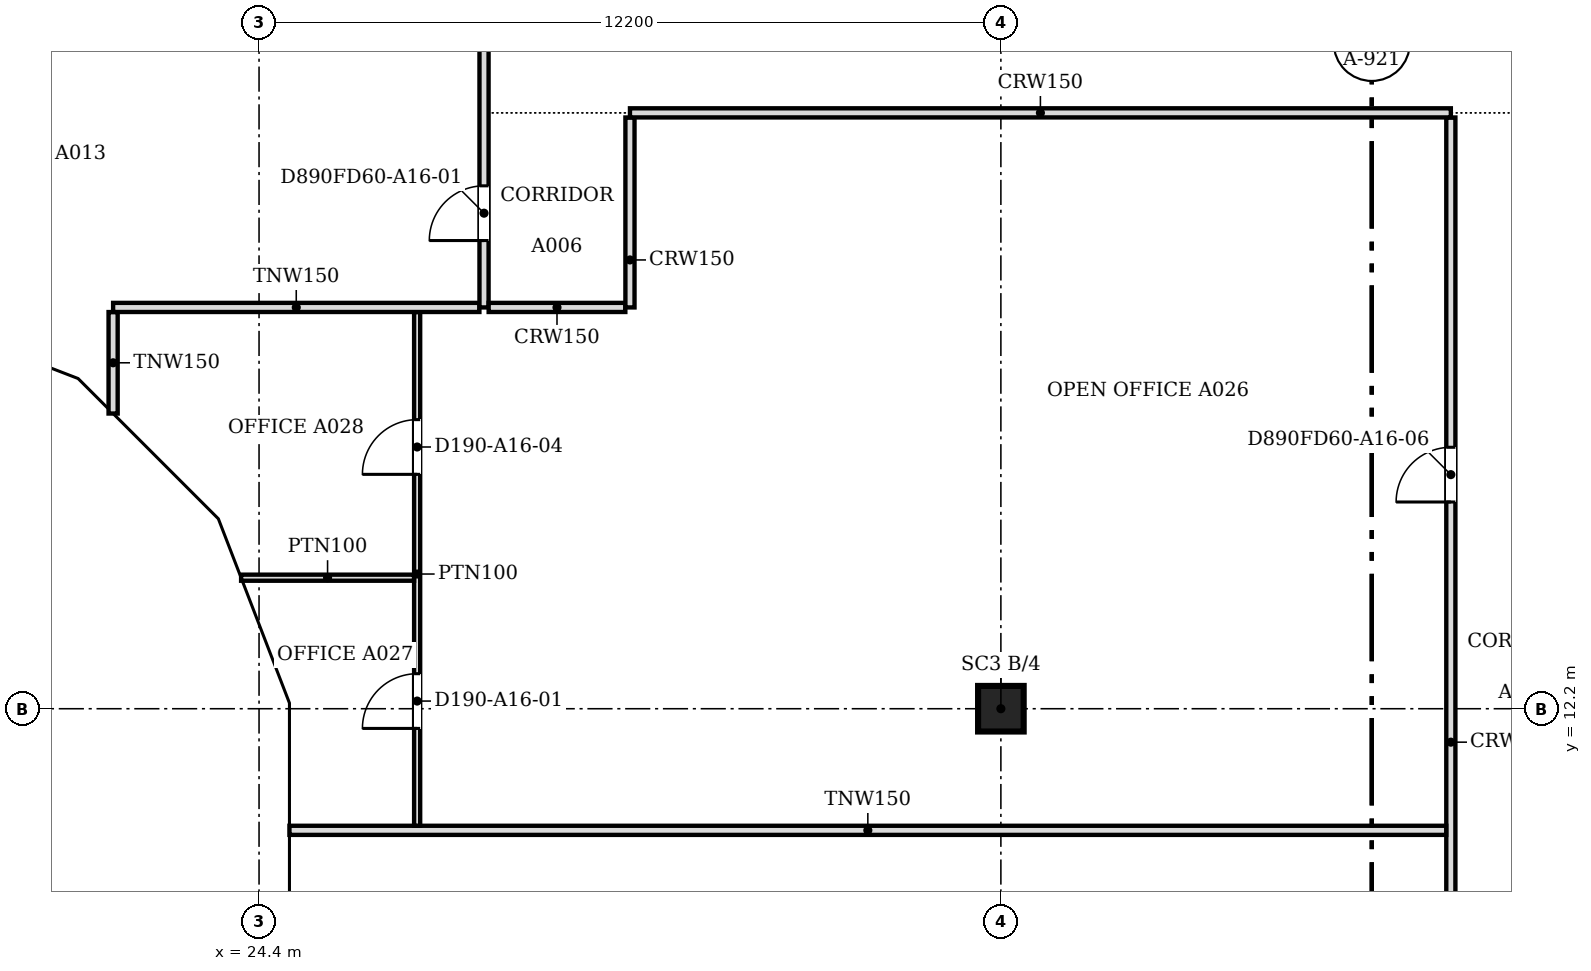
"""IFC4 building model, lengths in metres.
Left out: names, types, materials, properties, quantities, classifications, styles, units other than length and angle.
Written with IfcOpenShell. Run it as: python <this file> out.ifc"""

import sys

from ifc_helpers import new_model, si_unit, direction, frame, frame_2d, origin, origin_2d, place, context, subcontext, project, spatial, polyline, rectangle, outline, extrude, faceted_brep, source, transform, mapped, element, fill, save


model = new_model("IFC4")
c1 = context("Model", 3, precision=1e-05, world=origin(), true_north=direction((0.0, 1.0)))
c2 = subcontext(c1, "Body", "Model", "MODEL_VIEW")
j1 = project(units=[si_unit("LENGTHUNIT", "METRE"), si_unit("PLANEANGLEUNIT", "RADIAN")], contexts=[c1])
p1 = place(None, origin())
s1 = spatial("IfcSite", under=j1, at=p1, CompositionType="ELEMENT")
p2 = place(p1, origin())
s2 = spatial("IfcBuilding", under=s1, at=p2, CompositionType="ELEMENT")
p3 = place(p2, frame((0.0, 0.0, 178.2)))
s3 = spatial("IfcBuildingStorey", under=s2, at=p3, CompositionType="ELEMENT", Elevation=178.2)
p4 = place(p3, frame((36.6, 12.2, 0.0), z_axis=(0.0, 0.0, 1.0), x_axis=(1.0, 0.0, 0.0)))
e1 = element("IfcColumn", 1, at=p4, inside=s3, PredefinedType="COLUMN", context=c2, shape_type="SweptSolid", body=[
    extrude(rectangle(XDim=0.75, YDim=0.75, at=origin_2d()), origin(), (0.0, 0.0, 1.0), 3.6),
])
m1 = source(origin(), c2, "Body", "Brep", [
    faceted_brep([(0.093, -0.25, 0.056), (3.143, -0.25, 3.736), (3.143, -0.25, 3.864), (0.093, -0.25, 7.544), (0.0, 0.25, 7.543), (0.047, 0.25, 7.6), (3.196, 0.25, 3.8), (0.047, 0.25, 0.0), (0.0, 0.25, 0.057), (3.196, -0.0, 3.8), (0.047, 0.0, 0.0), (0.047, 0.0, 7.6)], [[[0, 1, 2, 3]], [[4, 5, 6, 7, 8]], [[7, 6, 9, 1, 0, 10]], [[6, 5, 11, 3, 2, 9]], [[5, 4, 11]], [[8, 7, 10]], [[8, 10, 0, 3, 11, 4]], [[1, 9, 2]]]),
])
p5 = place(p3, frame((18.303, 18.567, -3.8), z_axis=(0.0, 0.0, 1.0), x_axis=(0.932978940178, -0.359930961693, 0.0)))
e2 = element("IfcWall", 2, at=p5, inside=s3, PredefinedType="SOLIDWALL", context=c2, shape_type="MappedRepresentation", body=[
    mapped(m1, transform((0.0, 0.0, 0.0), scale=1.0)),
])
m2 = source(origin(), c2, "Body", "SweptSolid", [
    extrude(outline(polyline([(0.247, 0.633), (2.871, 3.8), (0.247, 6.967), (0.247, 0.633)])), frame((0.0, 0.26, 0.0), z_axis=(0.0, -1.0, 0.0), x_axis=(1.0, 0.0, 0.0)), (0.0, 0.0, 1.0), 0.52),
])
p6 = place(p5, origin())
e3 = element("IfcOpeningElement", 3, at=p6, cuts=e2, PredefinedType="OPENING", context=c2, shape_type="MappedRepresentation", body=[
    mapped(m2, transform((0.0, 0.0, 0.0), scale=1.0)),
])
m3 = source(origin(), c2, "Body", "Brep", [
    faceted_brep([(3.103, -0.25, 7.536), (0.053, -0.25, 3.864), (0.053, -0.25, 3.736), (3.103, -0.25, 0.064), (0.0, 0.25, 3.8), (3.156, 0.25, 7.6), (3.209, 0.25, 7.536), (3.209, 0.25, 0.064), (3.156, 0.25, 0.0), (3.156, -0.0, 0.0), (3.156, -0.0, 7.6), (0.0, 0.0, 3.8)], [[[0, 1, 2, 3]], [[4, 5, 6, 7, 8]], [[8, 7, 9]], [[6, 5, 10]], [[5, 4, 11, 1, 0, 10]], [[4, 8, 9, 3, 2, 11]], [[11, 2, 1]], [[3, 9, 7, 6, 10, 0]]]),
])
p7 = place(p3, frame((21.285, 17.417, -3.8), z_axis=(0.0, 0.0, 1.0), x_axis=(0.707106781187, -0.707106781187, 0.0)))
e4 = element("IfcWall", 4, at=p7, inside=s3, PredefinedType="SOLIDWALL", context=c2, shape_type="MappedRepresentation", body=[
    mapped(m3, transform((0.0, 0.0, 0.0), scale=1.0)),
])
m4 = source(origin(), c2, "Body", "SweptSolid", [
    extrude(outline(polyline([(2.956, 6.968), (0.325, 3.8), (2.956, 0.632), (2.956, 6.968)])), frame((0.0, 0.26, 0.0), z_axis=(0.0, -1.0, 0.0), x_axis=(1.0, 0.0, 0.0)), (0.0, 0.0, 1.0), 0.52),
])
p8 = place(p7, origin())
e5 = element("IfcOpeningElement", 5, at=p8, cuts=e4, PredefinedType="OPENING", context=c2, shape_type="MappedRepresentation", body=[
    mapped(m4, transform((0.0, 0.0, 0.0), scale=1.0)),
])
m5 = source(origin(), c2, "Body", "Brep", [
    faceted_brep([(0.106, -0.25, 0.064), (3.156, -0.25, 3.744), (3.156, -0.25, 3.856), (0.106, -0.25, 7.536), (0.0, 0.25, 7.536), (0.053, 0.25, 7.6), (3.202, 0.25, 3.8), (0.053, 0.25, 0.0), (0.0, 0.25, 0.064), (3.202, -0.0, 3.8), (0.053, 0.0, 0.0), (0.053, 0.0, 7.6)], [[[0, 1, 2, 3]], [[4, 5, 6, 7, 8]], [[7, 6, 9, 1, 0, 10]], [[6, 5, 11, 3, 2, 9]], [[5, 4, 11]], [[8, 7, 10]], [[8, 10, 0, 3, 11, 4]], [[1, 9, 2]]]),
])
p9 = place(p3, frame((23.497, 15.234, -3.8), z_axis=(0.0, 0.0, 1.0), x_axis=(0.359913782069, -0.932985567668, 0.0)))
e6 = element("IfcWall", 6, at=p9, inside=s3, PredefinedType="SOLIDWALL", context=c2, shape_type="MappedRepresentation", body=[
    mapped(m5, transform((0.0, 0.0, 0.0), scale=1.0)),
])
m6 = source(origin(), c2, "Body", "SweptSolid", [
    extrude(outline(polyline([(0.253, 0.633), (2.878, 3.8), (0.253, 6.967), (0.253, 0.633)])), frame((0.0, 0.26, 0.0), z_axis=(0.0, -1.0, 0.0), x_axis=(1.0, 0.0, 0.0)), (0.0, 0.0, 1.0), 0.52),
])
p10 = place(p9, origin())
e7 = element("IfcOpeningElement", 7, at=p10, cuts=e6, PredefinedType="OPENING", context=c2, shape_type="MappedRepresentation", body=[
    mapped(m6, transform((0.0, 0.0, 0.0), scale=1.0)),
])
m7 = source(origin(), c2, "Body", "Brep", [
    faceted_brep([(3.096, -0.25, 0.0), (6.1, -0.25, 3.8), (3.096, -0.25, 7.6), (0.047, -0.25, 3.857), (0.047, -0.25, 3.743), (0.0, 0.25, 3.8), (3.096, 0.25, 7.6), (6.053, 0.25, 3.859), (6.053, 0.25, 3.741), (3.096, 0.25, 0.0), (6.1, -0.0, 3.8), (0.0, 0.0, 3.8)], [[[0, 1, 2, 3, 4]], [[5, 6, 7, 8, 9]], [[9, 8, 10, 1, 0]], [[7, 6, 2, 1, 10]], [[6, 5, 11, 3, 2]], [[5, 9, 0, 4, 11]], [[11, 4, 3]], [[10, 8, 7]]]),
])
p11 = place(p3, frame((24.65, 12.247, -3.8), z_axis=(0.0, 0.0, 1.0), x_axis=(0.0, -1.0, 0.0)))
e8 = element("IfcWall", 8, at=p11, inside=s3, PredefinedType="SOLIDWALL", context=c2, shape_type="MappedRepresentation", body=[
    mapped(m7, transform((0.0, 0.0, 0.0), scale=1.0)),
])
m8 = source(origin(), c2, "Body", "SweptSolid", [
    extrude(outline(polyline([(3.094, 0.399), (5.781, 3.8), (3.094, 7.201), (0.323, 3.8), (3.094, 0.399)])), frame((0.0, 0.26, 0.0), z_axis=(0.0, -1.0, 0.0), x_axis=(1.0, 0.0, 0.0)), (0.0, 0.0, 1.0), 0.52),
])
p12 = place(p11, origin())
e9 = element("IfcOpeningElement", 9, at=p12, cuts=e8, PredefinedType="OPENING", context=c2, shape_type="MappedRepresentation", body=[
    mapped(m8, transform((0.0, 0.0, 0.0), scale=1.0)),
])
p13 = place(p2, frame((0.0, 0.0, 182.0)))
s4 = spatial("IfcBuildingStorey", under=s2, at=p13, CompositionType="ELEMENT", Elevation=182.0)
m9 = source(origin(), c2, "Body", "Brep", [
    faceted_brep([(3.096, -0.25, 7.536), (0.047, -0.25, 3.856), (0.047, -0.25, 3.744), (3.096, -0.25, 0.064), (0.0, 0.25, 3.8), (3.149, 0.25, 7.6), (3.202, 0.25, 7.536), (3.202, 0.25, 0.064), (3.149, 0.25, 0.0), (3.149, -0.0, 0.0), (3.149, -0.0, 7.6), (0.0, 0.0, 3.8)], [[[0, 1, 2, 3]], [[4, 5, 6, 7, 8]], [[8, 7, 9]], [[6, 5, 10]], [[5, 4, 11, 1, 0, 10]], [[4, 8, 9, 3, 2, 11]], [[11, 2, 1]], [[3, 9, 7, 6, 10, 0]]]),
])
p14 = place(p13, frame((18.346, 18.55, -3.8), z_axis=(0.0, 0.0, 1.0), x_axis=(0.932985567668, -0.359913782069, 0.0)))
e10 = element("IfcWall", 10, at=p14, inside=s4, PredefinedType="SOLIDWALL", context=c2, shape_type="MappedRepresentation", body=[
    mapped(m9, transform((0.0, 0.0, 0.0), scale=1.0)),
])
m10 = source(origin(), c2, "Body", "SweptSolid", [
    extrude(outline(polyline([(2.949, 6.967), (0.325, 3.8), (2.949, 0.633), (2.949, 6.967)])), frame((0.0, 0.26, 0.0), z_axis=(0.0, -1.0, 0.0), x_axis=(1.0, 0.0, 0.0)), (0.0, 0.0, 1.0), 0.52),
])
p15 = place(p14, origin())
e11 = element("IfcOpeningElement", 11, at=p15, cuts=e10, PredefinedType="OPENING", context=c2, shape_type="MappedRepresentation", body=[
    mapped(m10, transform((0.0, 0.0, 0.0), scale=1.0)),
])
m11 = source(origin(), c2, "Body", "Brep", [
    faceted_brep([(0.106, -0.25, 0.064), (3.156, -0.25, 3.736), (3.156, -0.25, 3.864), (0.106, -0.25, 7.536), (0.0, 0.25, 7.536), (0.053, 0.25, 7.6), (3.209, 0.25, 3.8), (0.053, 0.25, 0.0), (0.0, 0.25, 0.064), (3.209, -0.0, 3.8), (0.053, 0.0, 0.0), (0.053, 0.0, 7.6)], [[[0, 1, 2, 3]], [[4, 5, 6, 7, 8]], [[7, 6, 9, 1, 0, 10]], [[6, 5, 11, 3, 2, 9]], [[5, 4, 11]], [[8, 7, 10]], [[8, 10, 0, 3, 11, 4]], [[1, 9, 2]]]),
])
p16 = place(p13, frame((21.248, 17.454, -3.8), z_axis=(0.0, 0.0, 1.0), x_axis=(0.707106781187, -0.707106781187, 0.0)))
e12 = element("IfcWall", 12, at=p16, inside=s4, PredefinedType="SOLIDWALL", context=c2, shape_type="MappedRepresentation", body=[
    mapped(m11, transform((0.0, 0.0, 0.0), scale=1.0)),
])
m12 = source(origin(), c2, "Body", "SweptSolid", [
    extrude(outline(polyline([(0.253, 0.632), (2.884, 3.8), (0.253, 6.968), (0.253, 0.632)])), frame((0.0, 0.26, 0.0), z_axis=(0.0, -1.0, 0.0), x_axis=(1.0, 0.0, 0.0)), (0.0, 0.0, 1.0), 0.52),
])
p17 = place(p16, origin())
e13 = element("IfcOpeningElement", 13, at=p17, cuts=e12, PredefinedType="OPENING", context=c2, shape_type="MappedRepresentation", body=[
    mapped(m12, transform((0.0, 0.0, 0.0), scale=1.0)),
])
m13 = source(origin(), c2, "Body", "Brep", [
    faceted_brep([(3.103, -0.25, 7.544), (0.053, -0.25, 3.864), (0.053, -0.25, 3.736), (3.103, -0.25, 0.056), (0.0, 0.25, 3.8), (3.149, 0.25, 7.6), (3.196, 0.25, 7.543), (3.196, 0.25, 0.057), (3.149, 0.25, 0.0), (3.149, -0.0, 0.0), (3.149, -0.0, 7.6), (0.0, 0.0, 3.8)], [[[0, 1, 2, 3]], [[4, 5, 6, 7, 8]], [[8, 7, 9]], [[6, 5, 10]], [[5, 4, 11, 1, 0, 10]], [[4, 8, 9, 3, 2, 11]], [[11, 2, 1]], [[3, 9, 7, 6, 10, 0]]]),
])
p18 = place(p13, frame((23.517, 15.185, -3.8), z_axis=(0.0, 0.0, 1.0), x_axis=(0.359864468756, -0.933004589553, 0.0)))
e14 = element("IfcWall", 14, at=p18, inside=s4, PredefinedType="SOLIDWALL", context=c2, shape_type="MappedRepresentation", body=[
    mapped(m13, transform((0.0, 0.0, 0.0), scale=1.0)),
])
p19 = place(p18, origin())
e15 = element("IfcOpeningElement", 15, at=p19, cuts=e14, PredefinedType="OPENING", context=c2, shape_type="MappedRepresentation", body=[
    mapped(m10, transform((0.0, 0.0, 0.0), scale=1.0)),
])
m14 = source(origin(), c2, "Body", "Brep", [
    faceted_brep([(0.093, -0.25, 0.057), (3.143, -0.25, 3.8), (0.093, -0.25, 7.543), (0.0, 0.25, 7.544), (0.047, 0.25, 7.6), (3.143, 0.25, 3.8), (0.047, 0.25, 0.0), (0.0, 0.25, 0.056), (0.047, 0.0, 0.0), (0.047, 0.0, 7.6)], [[[0, 1, 2]], [[3, 4, 5, 6, 7]], [[6, 5, 1, 0, 8]], [[5, 4, 9, 2, 1]], [[4, 3, 9]], [[7, 6, 8]], [[7, 8, 0, 2, 9, 3]]]),
])
p20 = place(p13, frame((24.65, 12.293, -3.8), z_axis=(0.0, 0.0, 1.0), x_axis=(0.0, -1.0, 0.0)))
e16 = element("IfcWall", 16, at=p20, inside=s4, PredefinedType="SOLIDWALL", context=c2, shape_type="MappedRepresentation", body=[
    mapped(m14, transform((0.0, 0.0, 0.0), scale=1.0)),
])
m15 = source(origin(), c2, "Body", "SweptSolid", [
    extrude(outline(polyline([(0.247, 0.641), (2.821, 3.8), (0.247, 6.959), (0.247, 0.641)])), frame((0.0, 0.26, 0.0), z_axis=(0.0, -1.0, 0.0), x_axis=(1.0, 0.0, 0.0)), (0.0, 0.0, 1.0), 0.52),
])
p21 = place(p20, origin())
e17 = element("IfcOpeningElement", 17, at=p21, cuts=e16, PredefinedType="OPENING", context=c2, shape_type="MappedRepresentation", body=[
    mapped(m15, transform((0.0, 0.0, 0.0), scale=1.0)),
])
p22 = place(p3, frame((44.0, 0.5, 0.0), z_axis=(0.0, 0.0, 1.0), x_axis=(0.0, 1.0, 0.0)))
e18 = element("IfcWall", 18, at=p22, inside=s3, PredefinedType="PARTITIONING", context=c2, shape_type="SweptSolid", body=[
    extrude(rectangle(XDim=21.424, YDim=0.15, at=frame_2d((10.712, 0.0))), origin(), (0.0, 0.0, 1.0), 3.067),
])
m16 = source(origin(), c2, "Body", "SweptSolid", [
    extrude(rectangle(XDim=1.0, YDim=2.1, at=frame_2d((0.5, 1.05))), frame((0.0, 0.085, 0.0), z_axis=(0.0, -1.0, 0.0), x_axis=(1.0, 0.0, 0.0)), (0.0, 0.0, 1.0), 0.17),
])
p23 = place(p22, frame((6.2, 0.0, 0.0)))
e19 = element("IfcOpeningElement", 19, at=p23, cuts=e18, PredefinedType="OPENING", context=c2, shape_type="MappedRepresentation", body=[
    mapped(m16, transform((0.0, 0.0, 0.0), scale=1.0)),
])
m17 = source(origin(), c2, "Body", "SweptSolid", [
    extrude(rectangle(XDim=0.9, YDim=2.1, at=frame_2d((0.45, 1.05))), frame((0.0, 0.085, 0.0), z_axis=(0.0, -1.0, 0.0), x_axis=(1.0, 0.0, 0.0)), (0.0, 0.0, 1.0), 0.17),
])
p24 = place(p22, frame((15.1, 0.0, 0.0)))
e20 = element("IfcOpeningElement", 20, at=p24, cuts=e18, PredefinedType="OPENING", context=c2, shape_type="MappedRepresentation", body=[
    mapped(m17, transform((0.0, 0.0, 0.0), scale=1.0)),
])
p25 = place(p3, frame((24.9, 10.2, 0.0), z_axis=(0.0, 0.0, 1.0), x_axis=(1.0, 0.0, 0.0)))
e21 = element("IfcWall", 21, at=p25, inside=s3, PredefinedType="PARTITIONING", context=c2, shape_type="SweptSolid", body=[
    extrude(rectangle(XDim=19.024, YDim=0.15, at=frame_2d((9.512, 0.0))), origin(), (0.0, 0.0, 1.0), 3.067),
])
p26 = place(p3, frame((27.0, 10.276, 0.0), z_axis=(0.0, 0.0, 1.0), x_axis=(0.0, 1.0, 0.0)))
e22 = element("IfcWall", 22, at=p26, inside=s3, PredefinedType="PARTITIONING", context=c2, shape_type="SweptSolid", body=[
    extrude(rectangle(XDim=8.448, YDim=0.1, at=frame_2d((4.224, 0.0))), origin(), (0.0, 0.0, 1.0), 3.067),
])
m18 = source(origin(), c2, "Body", "SweptSolid", [
    extrude(rectangle(XDim=0.9, YDim=2.1, at=frame_2d((0.45, 1.05))), frame((0.0, 0.06, 0.0), z_axis=(0.0, -1.0, 0.0), x_axis=(1.0, 0.0, 0.0)), (0.0, 0.0, 1.0), 0.12),
])
p27 = place(p26, frame((1.6, 0.0, 0.0)))
e23 = element("IfcOpeningElement", 23, at=p27, cuts=e22, PredefinedType="OPENING", context=c2, shape_type="MappedRepresentation", body=[
    mapped(m18, transform((0.0, 0.0, 0.0), scale=1.0)),
])
p28 = place(p26, frame((5.779, 0.0, 0.0)))
e24 = element("IfcOpeningElement", 24, at=p28, cuts=e22, PredefinedType="OPENING", context=c2, shape_type="MappedRepresentation", body=[
    mapped(m18, transform((0.0, 0.0, 0.0), scale=1.0)),
])
p29 = place(p3, frame((24.105, 14.355, 0.0), z_axis=(0.0, 0.0, 1.0), x_axis=(1.0, 0.0, 0.0)))
e25 = element("IfcWall", 25, at=p29, inside=s3, PredefinedType="PARTITIONING", context=c2, shape_type="SweptSolid", body=[
    extrude(rectangle(XDim=2.844, YDim=0.1, at=frame_2d((1.422, 0.0))), origin(), (0.0, 0.0, 1.0), 3.067),
])
p30 = place(p3, frame((22.0, 17.055, 0.0), z_axis=(0.0, 0.0, 1.0), x_axis=(0.0, 1.0, 0.0)))
e26 = element("IfcWall", 26, at=p30, inside=s3, PredefinedType="PARTITIONING", context=c2, shape_type="SweptSolid", body=[
    extrude(rectangle(XDim=1.669, YDim=0.15, at=frame_2d((0.834, 0.0))), origin(), (0.0, 0.0, 1.0), 3.067),
])
p31 = place(p3, frame((22.0, 18.8, 0.0), z_axis=(0.0, 0.0, 1.0), x_axis=(1.0, 0.0, 0.0)))
e27 = element("IfcWall", 27, at=p31, inside=s3, PredefinedType="PARTITIONING", context=c2, shape_type="SweptSolid", body=[
    extrude(rectangle(XDim=6.024, YDim=0.15, at=frame_2d((3.012, 0.0))), origin(), (0.0, 0.0, 1.0), 3.067),
])
p32 = place(p3, frame((28.1, 18.8, 0.0), z_axis=(0.0, 0.0, 1.0), x_axis=(0.0, 1.0, 0.0)))
e28 = element("IfcWall", 28, at=p32, inside=s3, PredefinedType="PARTITIONING", context=c2, shape_type="SweptSolid", body=[
    extrude(rectangle(XDim=26.024, YDim=0.15, at=frame_2d((13.012, 0.0))), origin(), (0.0, 0.0, 1.0), 3.067),
])
p33 = place(p32, frame((1.1, 0.0, 0.0)))
e29 = element("IfcOpeningElement", 29, at=p33, cuts=e28, PredefinedType="OPENING", context=c2, shape_type="MappedRepresentation", body=[
    mapped(m17, transform((0.0, 0.0, 0.0), scale=1.0)),
])
p34 = place(p32, frame((22.951, 0.0, 0.0)))
e30 = element("IfcOpeningElement", 30, at=p34, cuts=e28, PredefinedType="OPENING", context=c2, shape_type="MappedRepresentation", body=[
    mapped(m17, transform((0.0, 0.0, 0.0), scale=1.0)),
])
p35 = place(p32, frame((17.251, 0.0, 0.0)))
e31 = element("IfcOpeningElement", 31, at=p35, cuts=e28, PredefinedType="OPENING", context=c2, shape_type="MappedRepresentation", body=[
    mapped(m16, transform((0.0, 0.0, 0.0), scale=1.0)),
])
p36 = place(p32, frame((9.7, 0.0, 0.0)))
e32 = element("IfcOpeningElement", 32, at=p36, cuts=e28, PredefinedType="OPENING", context=c2, shape_type="MappedRepresentation", body=[
    mapped(m17, transform((0.0, 0.0, 0.0), scale=1.0)),
])
p37 = place(p3, frame((28.176, 18.8, 0.0), z_axis=(0.0, 0.0, 1.0), x_axis=(1.0, 0.0, 0.0)))
e33 = element("IfcWall", 33, at=p37, inside=s3, PredefinedType="PARTITIONING", context=c2, shape_type="SweptSolid", body=[
    extrude(rectangle(XDim=2.248, YDim=0.15, at=frame_2d((1.124, 0.0))), origin(), (0.0, 0.0, 1.0), 3.067),
])
p38 = place(p3, frame((30.5, 18.8, 0.0), z_axis=(0.0, 0.0, 1.0), x_axis=(0.0, 1.0, 0.0)))
e34 = element("IfcWall", 34, at=p38, inside=s3, PredefinedType="PARTITIONING", context=c2, shape_type="SweptSolid", body=[
    extrude(rectangle(XDim=3.124, YDim=0.15, at=frame_2d((1.562, 0.0))), origin(), (0.0, 0.0, 1.0), 3.067),
])
p39 = place(p3, frame((30.5, 22.0, 0.0), z_axis=(0.0, 0.0, 1.0), x_axis=(1.0, 0.0, 0.0)))
e35 = element("IfcWall", 35, at=p39, inside=s3, PredefinedType="PARTITIONING", context=c2, shape_type="SweptSolid", body=[
    extrude(rectangle(XDim=13.5, YDim=0.15, at=frame_2d((6.75, 0.0))), origin(), (0.0, 0.0, 1.0), 3.067),
])
m19 = source(origin(), c2, "Body", "SweptSolid", [
    extrude(rectangle(XDim=0.9, YDim=2.1, at=frame_2d((0.45, 1.05))), frame((0.0, 0.025, 0.0), z_axis=(0.0, -1.0, 0.0), x_axis=(1.0, 0.0, 0.0)), (0.0, 0.0, 1.0), 0.05),
])
p40 = place(p33, origin())
e36 = element("IfcDoor", 36, at=p40, inside=s3, OperationType="SINGLE_SWING_LEFT", PredefinedType="DOOR", context=c2, shape_type="MappedRepresentation", body=[
    mapped(m19, transform((0.0, 0.0, 0.0), scale=1.0)),
])
fill(e29, e36)
p41 = place(p27, origin())
e37 = element("IfcDoor", 37, at=p41, inside=s3, OperationType="SINGLE_SWING_LEFT", PredefinedType="DOOR", context=c2, shape_type="MappedRepresentation", body=[
    mapped(m19, transform((0.0, 0.0, 0.0), scale=1.0)),
])
fill(e23, e37)
p42 = place(p28, origin())
e38 = element("IfcDoor", 38, at=p42, inside=s3, OperationType="SINGLE_SWING_LEFT", PredefinedType="DOOR", context=c2, shape_type="MappedRepresentation", body=[
    mapped(m19, transform((0.0, 0.0, 0.0), scale=1.0)),
])
fill(e24, e38)
p43 = place(p24, origin())
e39 = element("IfcDoor", 39, at=p43, inside=s3, OperationType="SINGLE_SWING_LEFT", PredefinedType="DOOR", context=c2, shape_type="MappedRepresentation", body=[
    mapped(m19, transform((0.0, 0.0, 0.0), scale=1.0)),
])
fill(e20, e39)
save(model, sys.argv[1])
